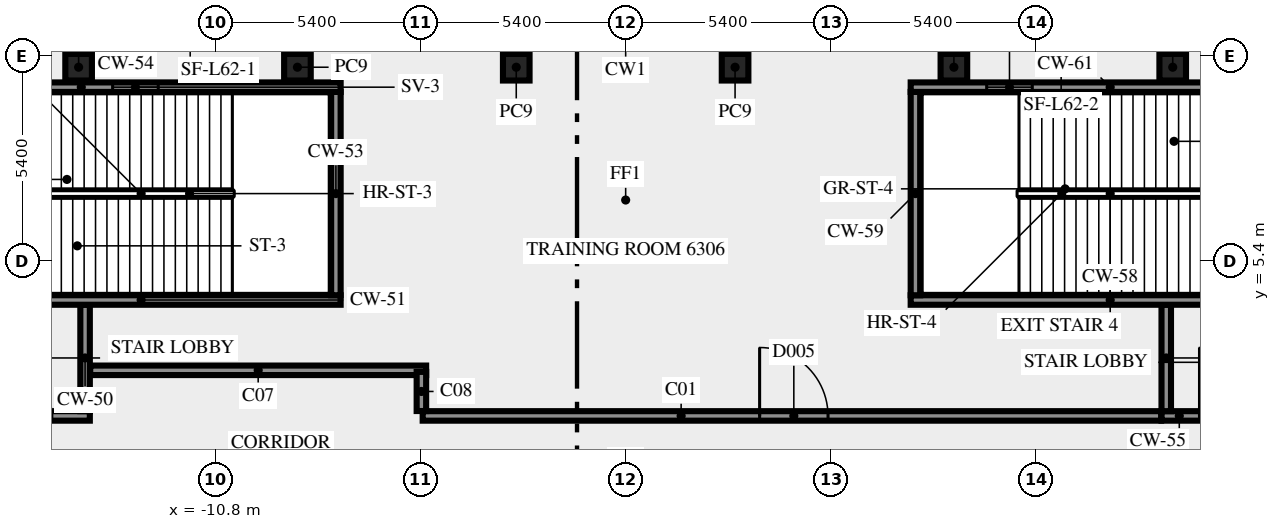
"""IFC4 building model, lengths in metres.
Left out: names, types, materials, properties, quantities, classifications, styles, units other than length and angle.
Written with IfcOpenShell. Run it as: python <this file> out.ifc"""

import sys

from ifc_helpers import new_model, si_unit, direction, frame, frame_2d, origin, origin_2d, place, context, subcontext, project, spatial, rectangle, extrude, element, fill, save


model = new_model("IFC4")
c1 = context("Model", 3, precision=1e-05, world=origin(), true_north=direction((0.0, 1.0)))
c2 = subcontext(c1, "Body", "Model", "MODEL_VIEW")
j1 = project(units=[si_unit("LENGTHUNIT", "METRE"), si_unit("PLANEANGLEUNIT", "RADIAN")], contexts=[c1])
p1 = place(None, origin())
s1 = spatial("IfcSite", under=j1, at=p1, CompositionType="ELEMENT")
p2 = place(p1, origin())
s2 = spatial("IfcBuilding", under=s1, at=p2, CompositionType="ELEMENT")
p3 = place(p2, frame((0.0, 0.0, 269.0)))
s3 = spatial("IfcBuildingStorey", under=s2, at=p3, CompositionType="ELEMENT", Elevation=269.0)
for number, where, z_axis, x_axis in (
    (1, (14.395, 10.5, 0.0), (0.0, 0.0, 1.0), (-1.0, 0.0, 0.0)),
    (2, (8.637, 10.5, 0.0), (0.0, 0.0, 1.0), (-1.0, 0.0, 0.0)),
    (3, (2.879, 10.5, 0.0), (0.0, 0.0, 1.0), (-1.0, 0.0, 0.0)),
    (4, (-2.879, 10.5, 0.0), (0.0, 0.0, 1.0), (-1.0, 0.0, 0.0)),
    (5, (-8.637, 10.5, 0.0), (0.0, 0.0, 1.0), (-1.0, 0.0, 0.0)),
    (6, (-14.395, 10.5, 0.0), (0.0, 0.0, 1.0), (-1.0, 0.0, 0.0)),
):
    element("IfcColumn", number, at=place(p3, frame(where, z_axis=z_axis, x_axis=x_axis)), inside=s3, PredefinedType="COLUMN", context=c2, shape_type="SweptSolid", body=[
        extrude(rectangle(XDim=0.7, YDim=0.7, at=origin_2d()), origin(), (0.0, 0.0, 1.0), 3.5),
    ])
p4 = place(p3, frame((-18.0, 1.325, 0.0), z_axis=(0.0, 0.0, 1.0), x_axis=(1.0, 0.0, 0.0)))
e7 = element("IfcWall", 7, at=p4, inside=s3, PredefinedType="SHEAR", context=c2, shape_type="SweptSolid", body=[
    extrude(rectangle(XDim=3.9, YDim=0.25, at=frame_2d((1.95, 0.0))), origin(), (0.0, 0.0, 1.0), 3.5),
])
p5 = place(p4, frame((1.1, 0.0, 0.0)))
e8 = element("IfcOpeningElement", 8, at=p5, cuts=e7, PredefinedType="OPENING", context=c2, shape_type="SweptSolid", body=[
    extrude(rectangle(XDim=1.8, YDim=2.1, at=frame_2d((0.9, 1.05))), frame((0.0, 0.135, 0.0), z_axis=(0.0, -1.0, 0.0), x_axis=(1.0, 0.0, 0.0)), (0.0, 0.0, 1.0), 0.27),
])
p6 = place(p3, frame((-14.225, 1.45, 0.0), z_axis=(0.0, 0.0, 1.0), x_axis=(0.0, 1.0, 0.0)))
e9 = element("IfcWall", 9, at=p6, inside=s3, PredefinedType="SHEAR", context=c2, shape_type="SweptSolid", body=[
    extrude(rectangle(XDim=2.8, YDim=0.25, at=frame_2d((1.4, 0.0))), origin(), (0.0, 0.0, 1.0), 3.5),
])
p7 = place(p3, frame((-18.0, 4.375, 0.0), z_axis=(0.0, 0.0, 1.0), x_axis=(1.0, 0.0, 0.0)))
e10 = element("IfcWall", 10, at=p7, inside=s3, PredefinedType="SHEAR", context=c2, shape_type="SweptSolid", body=[
    extrude(rectangle(XDim=10.5, YDim=0.25, at=frame_2d((5.25, 0.0))), origin(), (0.0, 0.0, 1.0), 3.5),
])
p8 = place(p7, frame((0.3, 0.0, 0.0)))
e11 = element("IfcOpeningElement", 11, at=p8, cuts=e10, PredefinedType="OPENING", context=c2, shape_type="SweptSolid", body=[
    extrude(rectangle(XDim=1.8, YDim=2.1, at=frame_2d((0.9, 1.05))), frame((0.0, 0.135, 0.0), z_axis=(0.0, -1.0, 0.0), x_axis=(1.0, 0.0, 0.0)), (0.0, 0.0, 1.0), 0.27),
])
p9 = place(p3, frame((-7.625, 4.5, 0.0), z_axis=(0.0, 0.0, 1.0), x_axis=(0.0, 1.0, 0.0)))
e12 = element("IfcWall", 12, at=p9, inside=s3, PredefinedType="SHEAR", context=c2, shape_type="SweptSolid", body=[
    extrude(rectangle(XDim=5.35, YDim=0.25, at=frame_2d((2.675, 0.0))), origin(), (0.0, 0.0, 1.0), 3.5),
])
p10 = place(p3, frame((-18.0, 9.975, 0.0), z_axis=(0.0, 0.0, 1.0), x_axis=(1.0, 0.0, 0.0)))
e13 = element("IfcWall", 13, at=p10, inside=s3, PredefinedType="SHEAR", context=c2, shape_type="SweptSolid", body=[
    extrude(rectangle(XDim=10.5, YDim=0.25, at=frame_2d((5.25, 0.0))), origin(), (0.0, 0.0, 1.0), 3.5),
])
p11 = place(p10, frame((4.5, 0.0, 1.0)))
e14 = element("IfcOpeningElement", 14, at=p11, cuts=e13, PredefinedType="OPENING", context=c2, shape_type="SweptSolid", body=[
    extrude(rectangle(XDim=1.2, YDim=1.2, at=frame_2d((0.6, 0.6))), frame((0.0, 0.135, 0.0), z_axis=(0.0, -1.0, 0.0), x_axis=(1.0, 0.0, 0.0)), (0.0, 0.0, 1.0), 0.27),
])
p12 = place(p3, frame((14.1, 1.325, 0.0), z_axis=(0.0, 0.0, 1.0), x_axis=(1.0, 0.0, 0.0)))
e15 = element("IfcWall", 15, at=p12, inside=s3, PredefinedType="SHEAR", context=c2, shape_type="SweptSolid", body=[
    extrude(rectangle(XDim=3.9, YDim=0.25, at=frame_2d((1.95, 0.0))), origin(), (0.0, 0.0, 1.0), 3.5),
])
p13 = place(p12, frame((1.0, 0.0, 0.0)))
e16 = element("IfcOpeningElement", 16, at=p13, cuts=e15, PredefinedType="OPENING", context=c2, shape_type="SweptSolid", body=[
    extrude(rectangle(XDim=1.8, YDim=2.1, at=frame_2d((0.9, 1.05))), frame((0.0, 0.135, 0.0), z_axis=(0.0, -1.0, 0.0), x_axis=(1.0, 0.0, 0.0)), (0.0, 0.0, 1.0), 0.27),
])
p14 = place(p3, frame((14.225, 1.45, 0.0), z_axis=(0.0, 0.0, 1.0), x_axis=(0.0, 1.0, 0.0)))
e17 = element("IfcWall", 17, at=p14, inside=s3, PredefinedType="SHEAR", context=c2, shape_type="SweptSolid", body=[
    extrude(rectangle(XDim=2.8, YDim=0.25, at=frame_2d((1.4, 0.0))), origin(), (0.0, 0.0, 1.0), 3.5),
])
p15 = place(p3, frame((7.5, 4.375, 0.0), z_axis=(0.0, 0.0, 1.0), x_axis=(1.0, 0.0, 0.0)))
e18 = element("IfcWall", 18, at=p15, inside=s3, PredefinedType="SHEAR", context=c2, shape_type="SweptSolid", body=[
    extrude(rectangle(XDim=10.5, YDim=0.25, at=frame_2d((5.25, 0.0))), origin(), (0.0, 0.0, 1.0), 3.5),
])
p16 = place(p15, frame((8.4, 0.0, 0.0)))
e19 = element("IfcOpeningElement", 19, at=p16, cuts=e18, PredefinedType="OPENING", context=c2, shape_type="SweptSolid", body=[
    extrude(rectangle(XDim=1.8, YDim=2.1, at=frame_2d((0.9, 1.05))), frame((0.0, 0.135, 0.0), z_axis=(0.0, -1.0, 0.0), x_axis=(1.0, 0.0, 0.0)), (0.0, 0.0, 1.0), 0.27),
])
p17 = place(p3, frame((7.625, 4.5, 0.0), z_axis=(0.0, 0.0, 1.0), x_axis=(0.0, 1.0, 0.0)))
e20 = element("IfcWall", 20, at=p17, inside=s3, PredefinedType="SHEAR", context=c2, shape_type="SweptSolid", body=[
    extrude(rectangle(XDim=5.35, YDim=0.25, at=frame_2d((2.675, 0.0))), origin(), (0.0, 0.0, 1.0), 3.5),
])
p18 = place(p3, frame((7.5, 9.975, 0.0), z_axis=(0.0, 0.0, 1.0), x_axis=(1.0, 0.0, 0.0)))
e21 = element("IfcWall", 21, at=p18, inside=s3, PredefinedType="SHEAR", context=c2, shape_type="SweptSolid", body=[
    extrude(rectangle(XDim=10.5, YDim=0.25, at=frame_2d((5.25, 0.0))), origin(), (0.0, 0.0, 1.0), 3.5),
])
p19 = place(p18, frame((2.0, 0.0, 1.0)))
e22 = element("IfcOpeningElement", 22, at=p19, cuts=e21, PredefinedType="OPENING", context=c2, shape_type="SweptSolid", body=[
    extrude(rectangle(XDim=1.2, YDim=1.2, at=frame_2d((0.6, 0.6))), frame((0.0, 0.135, 0.0), z_axis=(0.0, -1.0, 0.0), x_axis=(1.0, 0.0, 0.0)), (0.0, 0.0, 1.0), 0.27),
])
p20 = place(p3, frame((-5.341, 1.325, 0.0), z_axis=(0.0, 0.0, 1.0), x_axis=(1.0, 0.0, 0.0)))
e23 = element("IfcWall", 23, at=p20, inside=s3, PredefinedType="SOLIDWALL", context=c2, shape_type="SweptSolid", body=[
    extrude(rectangle(XDim=19.431, YDim=0.25, at=frame_2d((9.716, 0.0))), origin(), (0.0, 0.0, 1.0), 3.5),
])
p21 = place(p20, frame((8.866, 0.0, 0.0)))
e24 = element("IfcOpeningElement", 24, at=p21, cuts=e23, PredefinedType="OPENING", context=c2, shape_type="SweptSolid", body=[
    extrude(rectangle(XDim=1.8, YDim=2.1, at=frame_2d((0.9, 1.05))), frame((0.0, 0.135, 0.0), z_axis=(0.0, -1.0, 0.0), x_axis=(1.0, 0.0, 0.0)), (0.0, 0.0, 1.0), 0.27),
])
p22 = place(p3, frame((-14.09, 2.525, 0.0), z_axis=(0.0, 0.0, 1.0), x_axis=(1.0, 0.0, 0.0)))
e25 = element("IfcWall", 25, at=p22, inside=s3, PredefinedType="SOLIDWALL", context=c2, shape_type="SweptSolid", body=[
    extrude(rectangle(XDim=8.84, YDim=0.25, at=frame_2d((4.42, 0.0))), origin(), (0.0, 0.0, 1.0), 3.5),
])
p23 = place(p3, frame((-5.375, 2.484, 0.0), z_axis=(0.0, 0.0, 1.0), x_axis=(0.0, -1.0, 0.0)))
e26 = element("IfcWall", 26, at=p23, inside=s3, PredefinedType="SOLIDWALL", context=c2, shape_type="SweptSolid", body=[
    extrude(rectangle(XDim=1.03, YDim=0.25, at=frame_2d((0.515, 0.0))), origin(), (0.0, 0.0, 1.0), 3.5),
])
p24 = place(p5, origin())
e27 = element("IfcDoor", 27, at=p24, inside=s3, OperationType="DOUBLE_DOOR_SINGLE_SWING", PredefinedType="DOOR", context=c2, shape_type="SweptSolid", body=[
    extrude(rectangle(XDim=1.8, YDim=2.1, at=frame_2d((0.9, 1.05))), frame((0.0, 0.025, 0.0), z_axis=(0.0, -1.0, 0.0), x_axis=(1.0, 0.0, 0.0)), (0.0, 0.0, 1.0), 0.05),
])
fill(e8, e27)
p25 = place(p11, origin())
e28 = element("IfcWindow", 28, at=p25, inside=s3, PartitioningType="SINGLE_PANEL", PredefinedType="WINDOW", context=c2, shape_type="SweptSolid", body=[
    extrude(rectangle(XDim=1.2, YDim=1.2, at=frame_2d((0.6, 0.6))), frame((0.0, 0.03, 0.0), z_axis=(0.0, -1.0, 0.0), x_axis=(1.0, 0.0, 0.0)), (0.0, 0.0, 1.0), 0.06),
])
fill(e14, e28)
p26 = place(p13, origin())
e29 = element("IfcDoor", 29, at=p26, inside=s3, OperationType="DOUBLE_DOOR_SINGLE_SWING", PredefinedType="DOOR", context=c2, shape_type="SweptSolid", body=[
    extrude(rectangle(XDim=1.8, YDim=2.1, at=frame_2d((0.9, 1.05))), frame((0.0, 0.025, 0.0), z_axis=(0.0, -1.0, 0.0), x_axis=(1.0, 0.0, 0.0)), (0.0, 0.0, 1.0), 0.05),
])
fill(e16, e29)
p27 = place(p19, origin())
e30 = element("IfcWindow", 30, at=p27, inside=s3, PartitioningType="SINGLE_PANEL", PredefinedType="WINDOW", context=c2, shape_type="SweptSolid", body=[
    extrude(rectangle(XDim=1.2, YDim=1.2, at=frame_2d((0.6, 0.6))), frame((0.0, 0.03, 0.0), z_axis=(0.0, -1.0, 0.0), x_axis=(1.0, 0.0, 0.0)), (0.0, 0.0, 1.0), 0.06),
])
fill(e22, e30)
p28 = place(p21, origin())
e31 = element("IfcDoor", 31, at=p28, inside=s3, OperationType="DOUBLE_DOOR_SINGLE_SWING", PredefinedType="DOOR", context=c2, shape_type="SweptSolid", body=[
    extrude(rectangle(XDim=1.8, YDim=2.1, at=frame_2d((0.9, 1.05))), frame((0.0, 0.025, 0.0), z_axis=(0.0, -1.0, 0.0), x_axis=(1.0, 0.0, 0.0)), (0.0, 0.0, 1.0), 0.05),
])
fill(e24, e31)
save(model, sys.argv[1])
